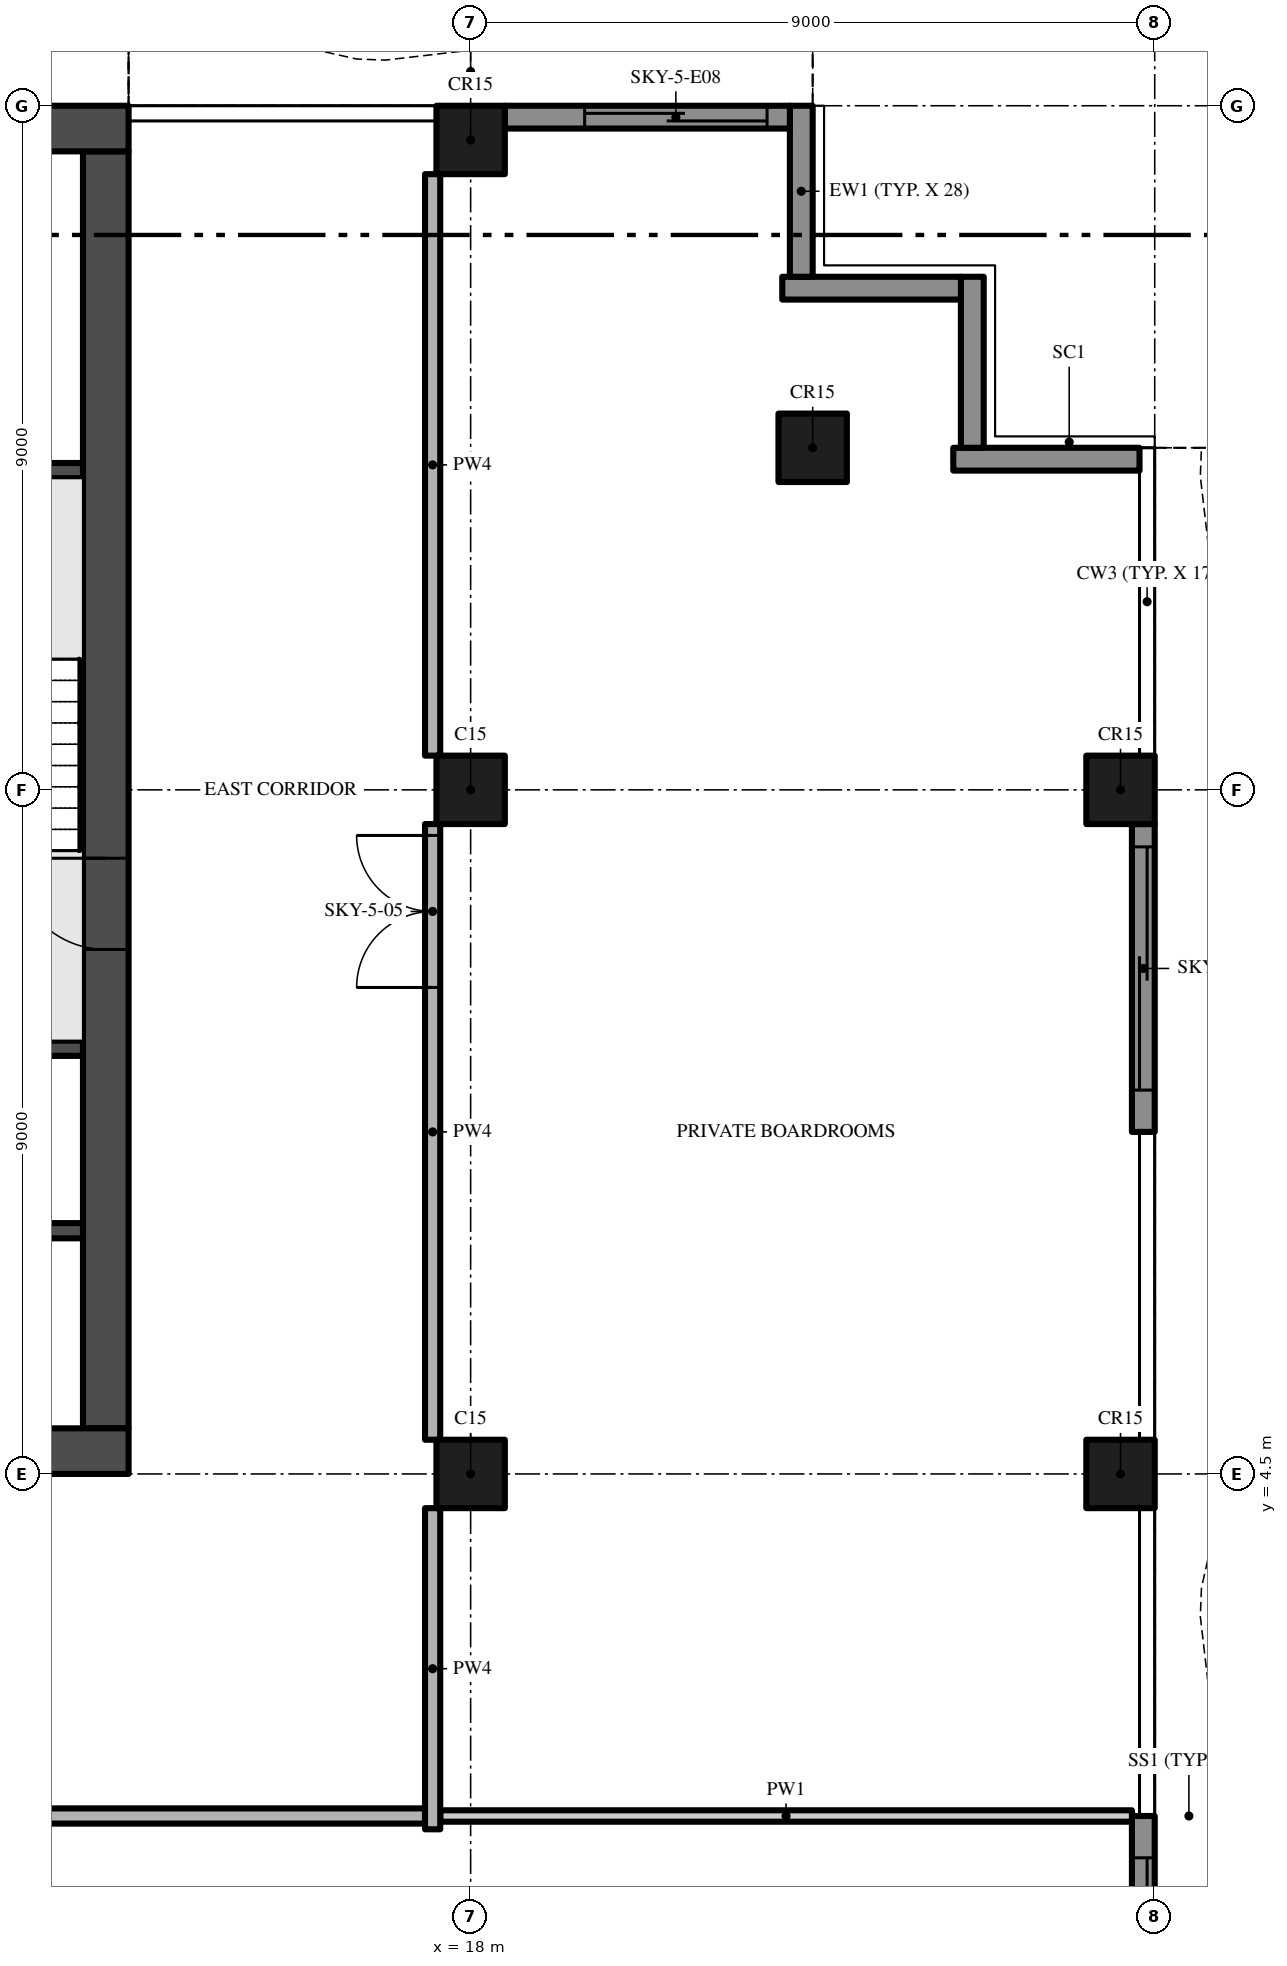
"""IFC4 building model, lengths in metres.
Left out: names, types, materials, properties, quantities, classifications, styles, units other than length and angle.
Written with IfcOpenShell. Run it as: python <this file> out.ifc"""

import sys

from ifc_helpers import new_model, si_unit, direction, frame, frame_2d, origin, origin_2d, place, context, subcontext, project, spatial, polyline, rectangle, outline, extrude, element, fill, save


model = new_model("IFC4")
c1 = context("Model", 3, precision=1e-05, world=origin(), true_north=direction((0.0, 1.0)))
c2 = subcontext(c1, "Body", "Model", "MODEL_VIEW")
j1 = project(units=[si_unit("LENGTHUNIT", "METRE"), si_unit("PLANEANGLEUNIT", "RADIAN")], contexts=[c1])
p1 = place(None, origin())
s1 = spatial("IfcSite", under=j1, at=p1, CompositionType="ELEMENT")
p2 = place(p1, origin())
s2 = spatial("IfcBuilding", under=s1, at=p2, CompositionType="ELEMENT")
p3 = place(p2, frame((0.0, 0.0, 284.4)))
s3 = spatial("IfcBuildingStorey", under=s2, at=p3, CompositionType="ELEMENT", Elevation=284.4)
p4 = place(p3, frame((-13.5, 4.8, -0.3), z_axis=(0.0, 0.0, 1.0), x_axis=(1.0, 0.0, 0.0)))
e1 = element("IfcWall", 1, at=p4, inside=s3, PredefinedType="SHEAR", context=c2, shape_type="SweptSolid", body=[
    extrude(rectangle(XDim=27.0, YDim=0.6, at=frame_2d((13.5, 0.0))), origin(), (0.0, 0.0, 1.0), 5.0),
])
p5 = place(p4, frame((12.0, 0.0, 0.3)))
e2 = element("IfcOpeningElement", 2, at=p5, cuts=e1, PredefinedType="OPENING", context=c2, shape_type="SweptSolid", body=[
    extrude(rectangle(XDim=3.0, YDim=2.4, at=frame_2d((1.5, 1.2))), frame((0.0, 0.31, 0.0), z_axis=(0.0, -1.0, 0.0), x_axis=(1.0, 0.0, 0.0)), (0.0, 0.0, 1.0), 0.62),
])
p6 = place(p4, frame((4.9, 0.0, 0.3)))
e3 = element("IfcOpeningElement", 3, at=p6, cuts=e1, PredefinedType="OPENING", context=c2, shape_type="SweptSolid", body=[
    extrude(rectangle(XDim=1.2, YDim=2.2, at=frame_2d((0.6, 1.1))), frame((0.0, 0.31, 0.0), z_axis=(0.0, -1.0, 0.0), x_axis=(1.0, 0.0, 0.0)), (0.0, 0.0, 1.0), 0.62),
])
p7 = place(p4, frame((20.75, 0.0, 0.3)))
e4 = element("IfcOpeningElement", 4, at=p7, cuts=e1, PredefinedType="OPENING", context=c2, shape_type="SweptSolid", body=[
    extrude(rectangle(XDim=1.5, YDim=2.2, at=frame_2d((0.75, 1.1))), frame((0.0, 0.31, 0.0), z_axis=(0.0, -1.0, 0.0), x_axis=(1.0, 0.0, 0.0)), (0.0, 0.0, 1.0), 0.62),
])
p8 = place(p4, frame((17.4, 0.0, 0.3)))
e5 = element("IfcOpeningElement", 5, at=p8, cuts=e1, PredefinedType="OPENING", context=c2, shape_type="SweptSolid", body=[
    extrude(rectangle(XDim=1.2, YDim=2.2, at=frame_2d((0.6, 1.1))), frame((0.0, 0.31, 0.0), z_axis=(0.0, -1.0, 0.0), x_axis=(1.0, 0.0, 0.0)), (0.0, 0.0, 1.0), 0.62),
])
p9 = place(p3, frame((13.2, 5.1, -0.3), z_axis=(0.0, 0.0, 1.0), x_axis=(0.0, 1.0, 0.0)))
e6 = element("IfcWall", 6, at=p9, inside=s3, PredefinedType="SHEAR", context=c2, shape_type="SweptSolid", body=[
    extrude(rectangle(XDim=16.8, YDim=0.6, at=frame_2d((8.4, 0.0))), origin(), (0.0, 0.0, 1.0), 5.0),
])
p10 = place(p9, frame((6.3, 0.0, 0.3)))
e7 = element("IfcOpeningElement", 7, at=p10, cuts=e6, PredefinedType="OPENING", context=c2, shape_type="SweptSolid", body=[
    extrude(rectangle(XDim=1.2, YDim=2.2, at=frame_2d((0.6, 1.1))), frame((0.0, 0.31, 0.0), z_axis=(0.0, -1.0, 0.0), x_axis=(1.0, 0.0, 0.0)), (0.0, 0.0, 1.0), 0.62),
])
p11 = place(p3, frame((13.5, 22.2, -0.3), z_axis=(0.0, 0.0, 1.0), x_axis=(-1.0, 0.0, 0.0)))
e8 = element("IfcWall", 8, at=p11, inside=s3, PredefinedType="SHEAR", context=c2, shape_type="SweptSolid", body=[
    extrude(rectangle(XDim=27.0, YDim=0.6, at=frame_2d((13.5, 0.0))), origin(), (0.0, 0.0, 1.0), 5.0),
])
for number, where, z_axis, x_axis in (
    (9, (18.0, 13.5, 0.0), (0.0, 0.0, 1.0), (1.0, 0.0, 0.0)),
    (10, (18.0, 22.05, 0.0), (0.0, 0.0, 1.0), (1.0, 0.0, 0.0)),
    (11, (18.0, 4.5, 0.0), (0.0, 0.0, 1.0), (1.0, 0.0, 0.0)),
    (12, (26.55, 13.5, 0.0), (0.0, 0.0, 1.0), (1.0, 0.0, 0.0)),
    (13, (22.5, 18.0, 0.0), (0.0, 0.0, 1.0), (1.0, 0.0, 0.0)),
    (14, (26.55, 4.5, 0.0), (0.0, 0.0, 1.0), (1.0, 0.0, 0.0)),
):
    element("IfcColumn", number, at=place(p3, frame(where, z_axis=z_axis, x_axis=x_axis)), inside=s3, PredefinedType="COLUMN", context=c2, shape_type="SweptSolid", body=[
        extrude(rectangle(XDim=0.9, YDim=0.9, at=origin_2d()), origin(), (0.0, 0.0, 1.0), 4.7),
    ])
p12 = place(p3, frame((26.85, 0.0, 0.0), z_axis=(0.0, 0.0, 1.0), x_axis=(0.0, -1.0, 0.0)))
e15 = element("IfcWall", 15, at=p12, inside=s3, PredefinedType="SOLIDWALL", context=c2, shape_type="SweptSolid", body=[
    extrude(rectangle(XDim=4.05, YDim=0.3, at=frame_2d((2.025, 0.0))), origin(), (0.0, 0.0, 1.0), 4.7),
])
p13 = place(p12, frame((0.55, 0.0, 0.0)))
e16 = element("IfcOpeningElement", 16, at=p13, cuts=e15, PredefinedType="OPENING", context=c2, shape_type="SweptSolid", body=[
    extrude(rectangle(XDim=3.2, YDim=2.4, at=frame_2d((1.6, 1.2))), frame((0.0, 0.16, 0.0), z_axis=(0.0, -1.0, 0.0), x_axis=(1.0, 0.0, 0.0)), (0.0, 0.0, 1.0), 0.32),
])
p14 = place(p3, frame((26.85, 13.05, 0.0), z_axis=(0.0, 0.0, 1.0), x_axis=(0.0, -1.0, 0.0)))
e17 = element("IfcWall", 17, at=p14, inside=s3, PredefinedType="SOLIDWALL", context=c2, shape_type="SweptSolid", body=[
    extrude(rectangle(XDim=4.05, YDim=0.3, at=frame_2d((2.025, 0.0))), origin(), (0.0, 0.0, 1.0), 4.7),
])
p15 = place(p14, frame((0.3, 0.0, 0.0)))
e18 = element("IfcOpeningElement", 18, at=p15, cuts=e17, PredefinedType="OPENING", context=c2, shape_type="SweptSolid", body=[
    extrude(rectangle(XDim=3.2, YDim=2.4, at=frame_2d((1.6, 1.2))), frame((0.0, 0.16, 0.0), z_axis=(0.0, -1.0, 0.0), x_axis=(1.0, 0.0, 0.0)), (0.0, 0.0, 1.0), 0.32),
])
p16 = place(p3, frame((24.35, 17.85, 0.0), z_axis=(0.0, 0.0, 1.0), x_axis=(1.0, 0.0, 0.0)))
e19 = element("IfcWall", 19, at=p16, inside=s3, PredefinedType="SOLIDWALL", context=c2, shape_type="SweptSolid", body=[
    extrude(rectangle(XDim=2.45, YDim=0.3, at=frame_2d((1.225, 0.0))), origin(), (0.0, 0.0, 1.0), 4.7),
])
p17 = place(p3, frame((24.6, 20.25, 0.0), z_axis=(0.0, 0.0, 1.0), x_axis=(0.0, -1.0, 0.0)))
e20 = element("IfcWall", 20, at=p17, inside=s3, PredefinedType="SOLIDWALL", context=c2, shape_type="SweptSolid", body=[
    extrude(rectangle(XDim=2.25, YDim=0.3, at=frame_2d((1.125, 0.0))), origin(), (0.0, 0.0, 1.0), 4.7),
])
p18 = place(p3, frame((22.1, 20.1, 0.0), z_axis=(0.0, 0.0, 1.0), x_axis=(1.0, 0.0, 0.0)))
e21 = element("IfcWall", 21, at=p18, inside=s3, PredefinedType="SOLIDWALL", context=c2, shape_type="SweptSolid", body=[
    extrude(rectangle(XDim=2.35, YDim=0.3, at=frame_2d((1.175, 0.0))), origin(), (0.0, 0.0, 1.0), 4.7),
])
p19 = place(p3, frame((22.35, 22.5, 0.0), z_axis=(0.0, 0.0, 1.0), x_axis=(0.0, -1.0, 0.0)))
e22 = element("IfcWall", 22, at=p19, inside=s3, PredefinedType="SOLIDWALL", context=c2, shape_type="SweptSolid", body=[
    extrude(rectangle(XDim=2.25, YDim=0.3, at=frame_2d((1.125, 0.0))), origin(), (0.0, 0.0, 1.0), 4.7),
])
p20 = place(p3, frame((18.45, 22.35, 0.0), z_axis=(0.0, 0.0, 1.0), x_axis=(1.0, 0.0, 0.0)))
e23 = element("IfcWall", 23, at=p20, inside=s3, PredefinedType="SOLIDWALL", context=c2, shape_type="SweptSolid", body=[
    extrude(rectangle(XDim=3.75, YDim=0.3, at=frame_2d((1.875, 0.0))), origin(), (0.0, 0.0, 1.0), 4.7),
])
p21 = place(p20, frame((1.05, 0.0, 0.0)))
e24 = element("IfcOpeningElement", 24, at=p21, cuts=e23, PredefinedType="OPENING", context=c2, shape_type="SweptSolid", body=[
    extrude(rectangle(XDim=2.4, YDim=2.4, at=frame_2d((1.2, 1.2))), frame((0.0, 0.16, 0.0), z_axis=(0.0, -1.0, 0.0), x_axis=(1.0, 0.0, 0.0)), (0.0, 0.0, 1.0), 0.32),
])
p22 = place(p3, origin())
e25 = element("IfcWall", 25, at=p22, inside=s3, PredefinedType="USERDEFINED", context=c2, shape_type="SweptSolid", body=[
    extrude(outline(polyline([(29.649, -18.0), (28.988, -16.5), (28.255, -15.0), (27.731, -13.5), (27.6, -12.375), (27.615, -12.0), (27.951, -10.5), (28.612, -9.0), (29.345, -7.5), (29.869, -6.0), (30.0, -4.875), (29.985, -4.5), (29.649, -3.0), (28.988, -1.5), (28.255, 0.0), (27.731, 1.5), (27.6, 2.625), (27.615, 3.0), (27.951, 4.5), (28.612, 6.0), (29.345, 7.5), (29.869, 9.0), (30.0, 10.125), (29.985, 10.5), (29.649, 12.0), (28.988, 13.5), (28.255, 15.0), (27.731, 16.5), (27.6, 17.625), (27.615, 18.0), (27.365, 18.01), (27.349, 17.615), (27.486, 16.444), (28.024, 14.904), (28.761, 13.395), (29.41, 11.921), (29.736, 10.467), (29.749, 10.135), (29.624, 9.056), (29.114, 7.596), (28.385, 6.105), (27.713, 4.579), (27.366, 3.033), (27.349, 2.615), (27.486, 1.444), (28.024, -0.096), (28.761, -1.605), (29.41, -3.079), (29.736, -4.533), (29.749, -4.865), (29.624, -5.944), (29.114, -7.404), (28.385, -8.895), (27.713, -10.421), (27.366, -11.967), (27.349, -12.385), (27.486, -13.556), (28.024, -15.096), (28.761, -16.605), (29.42, -18.101), (29.649, -18.0)])), origin(), (0.0, 0.0, 1.0), 0.9),
])
p23 = place(p3, origin())
e26 = element("IfcWall", 26, at=p23, inside=s3, PredefinedType="USERDEFINED", context=c2, shape_type="SweptSolid", body=[
    extrude(outline(polyline([(22.5, 25.149), (21.0, 24.488), (19.5, 23.755), (18.0, 23.231), (16.875, 23.1), (16.5, 23.115), (15.0, 23.451), (13.5, 24.112), (13.399, 23.883), (14.921, 23.213), (16.467, 22.866), (16.885, 22.849), (18.056, 22.986), (19.596, 23.524), (21.105, 24.261), (22.601, 24.92), (22.5, 25.149)])), origin(), (0.0, 0.0, 1.0), 0.9),
])
for number, where, z_axis, x_axis in (
    (27, (9.65, 7.7, 0.0), (0.0, 0.0, 1.0), (1.0, 0.0, 0.0)),
    (28, (9.65, 10.1, 0.0), (0.0, 0.0, 1.0), (1.0, 0.0, 0.0)),
    (29, (9.65, 17.7, 0.0), (0.0, 0.0, 1.0), (1.0, 0.0, 0.0)),
):
    element("IfcWall", number, at=place(p3, frame(where, z_axis=z_axis, x_axis=x_axis)), inside=s3, PredefinedType="SHEAR", context=c2, shape_type="SweptSolid", body=[
        extrude(rectangle(XDim=3.25, YDim=0.2, at=frame_2d((1.625, 0.0))), origin(), (0.0, 0.0, 1.0), 4.7),
    ])
p24 = place(p3, frame((-17.4, 0.0, 0.0), z_axis=(0.0, 0.0, 1.0), x_axis=(1.0, 0.0, 0.0)))
e30 = element("IfcWall", 30, at=p24, inside=s3, PredefinedType="PARTITIONING", context=c2, shape_type="SweptSolid", body=[
    extrude(rectangle(XDim=34.8, YDim=0.2, at=frame_2d((17.4, 0.0))), origin(), (0.0, 0.0, 1.0), 4.7),
])
p25 = place(p24, frame((7.65, 0.0, 0.0)))
e31 = element("IfcOpeningElement", 31, at=p25, cuts=e30, PredefinedType="OPENING", context=c2, shape_type="SweptSolid", body=[
    extrude(rectangle(XDim=2.0, YDim=2.4, at=frame_2d((1.0, 1.2))), frame((0.0, 0.11, 0.0), z_axis=(0.0, -1.0, 0.0), x_axis=(1.0, 0.0, 0.0)), (0.0, 0.0, 1.0), 0.22),
])
p26 = place(p24, frame((25.15, 0.0, 0.0)))
e32 = element("IfcOpeningElement", 32, at=p26, cuts=e30, PredefinedType="OPENING", context=c2, shape_type="SweptSolid", body=[
    extrude(rectangle(XDim=2.0, YDim=2.4, at=frame_2d((1.0, 1.2))), frame((0.0, 0.11, 0.0), z_axis=(0.0, -1.0, 0.0), x_axis=(1.0, 0.0, 0.0)), (0.0, 0.0, 1.0), 0.22),
])
p27 = place(p3, frame((17.6, 0.0, 0.0), z_axis=(0.0, 0.0, 1.0), x_axis=(1.0, 0.0, 0.0)))
e33 = element("IfcWall", 33, at=p27, inside=s3, PredefinedType="PARTITIONING", context=c2, shape_type="SweptSolid", body=[
    extrude(rectangle(XDim=9.1, YDim=0.15, at=frame_2d((4.55, 0.0))), origin(), (0.0, 0.0, 1.0), 4.7),
])
p28 = place(p3, frame((17.5, -0.175, 0.0), z_axis=(0.0, 0.0, 1.0), x_axis=(0.0, 1.0, 0.0)))
e34 = element("IfcWall", 34, at=p28, inside=s3, PredefinedType="PARTITIONING", context=c2, shape_type="SweptSolid", body=[
    extrude(rectangle(XDim=4.225, YDim=0.2, at=frame_2d((2.112, 0.0))), origin(), (0.0, 0.0, 1.0), 4.7),
])
p29 = place(p3, frame((17.5, 4.95, 0.0), z_axis=(0.0, 0.0, 1.0), x_axis=(0.0, 1.0, 0.0)))
e35 = element("IfcWall", 35, at=p29, inside=s3, PredefinedType="PARTITIONING", context=c2, shape_type="SweptSolid", body=[
    extrude(rectangle(XDim=8.1, YDim=0.2, at=frame_2d((4.05, 0.0))), origin(), (0.0, 0.0, 1.0), 4.7),
])
p30 = place(p29, frame((5.95, 0.0, 0.0)))
e36 = element("IfcOpeningElement", 36, at=p30, cuts=e35, PredefinedType="OPENING", context=c2, shape_type="SweptSolid", body=[
    extrude(rectangle(XDim=2.0, YDim=2.4, at=frame_2d((1.0, 1.2))), frame((0.0, 0.11, 0.0), z_axis=(0.0, -1.0, 0.0), x_axis=(1.0, 0.0, 0.0)), (0.0, 0.0, 1.0), 0.22),
])
p31 = place(p3, frame((17.5, 13.95, 0.0), z_axis=(0.0, 0.0, 1.0), x_axis=(0.0, 1.0, 0.0)))
e37 = element("IfcWall", 37, at=p31, inside=s3, PredefinedType="PARTITIONING", context=c2, shape_type="SweptSolid", body=[
    extrude(rectangle(XDim=7.65, YDim=0.2, at=frame_2d((3.825, 0.0))), origin(), (0.0, 0.0, 1.0), 4.7),
])
p32 = place(p13, origin())
e38 = element("IfcDoor", 38, at=p32, inside=s3, OperationType="SINGLE_SWING_LEFT", PredefinedType="DOOR", context=c2, shape_type="SweptSolid", body=[
    extrude(rectangle(XDim=3.2, YDim=2.4, at=frame_2d((1.6, 1.2))), frame((0.0, 0.025, 0.0), z_axis=(0.0, -1.0, 0.0), x_axis=(1.0, 0.0, 0.0)), (0.0, 0.0, 1.0), 0.05),
])
fill(e16, e38)
p33 = place(p15, origin())
e39 = element("IfcDoor", 39, at=p33, inside=s3, OperationType="SINGLE_SWING_LEFT", PredefinedType="DOOR", context=c2, shape_type="SweptSolid", body=[
    extrude(rectangle(XDim=3.2, YDim=2.4, at=frame_2d((1.6, 1.2))), frame((0.0, 0.025, 0.0), z_axis=(0.0, -1.0, 0.0), x_axis=(1.0, 0.0, 0.0)), (0.0, 0.0, 1.0), 0.05),
])
fill(e18, e39)
p34 = place(p21, origin())
e40 = element("IfcDoor", 40, at=p34, inside=s3, OperationType="SINGLE_SWING_LEFT", PredefinedType="DOOR", context=c2, shape_type="SweptSolid", body=[
    extrude(rectangle(XDim=2.4, YDim=2.4, at=frame_2d((1.2, 1.2))), frame((0.0, 0.025, 0.0), z_axis=(0.0, -1.0, 0.0), x_axis=(1.0, 0.0, 0.0)), (0.0, 0.0, 1.0), 0.05),
])
fill(e24, e40)
p35 = place(p10, frame((1.2, 0.0, 0.0), z_axis=(0.0, 0.0, 1.0), x_axis=(-1.0, 0.0, 0.0)))
e41 = element("IfcDoor", 41, at=p35, inside=s3, OperationType="SINGLE_SWING_LEFT", PredefinedType="DOOR", context=c2, shape_type="SweptSolid", body=[
    extrude(rectangle(XDim=1.2, YDim=2.2, at=frame_2d((0.6, 1.1))), frame((0.0, 0.025, 0.0), z_axis=(0.0, -1.0, 0.0), x_axis=(1.0, 0.0, 0.0)), (0.0, 0.0, 1.0), 0.05),
])
fill(e7, e41)
p36 = place(p30, origin())
e42 = element("IfcDoor", 42, at=p36, inside=s3, OperationType="DOUBLE_DOOR_SINGLE_SWING", PredefinedType="DOOR", context=c2, shape_type="SweptSolid", body=[
    extrude(rectangle(XDim=2.0, YDim=2.4, at=frame_2d((1.0, 1.2))), frame((0.0, 0.025, 0.0), z_axis=(0.0, -1.0, 0.0), x_axis=(1.0, 0.0, 0.0)), (0.0, 0.0, 1.0), 0.05),
])
fill(e36, e42)
save(model, sys.argv[1])
